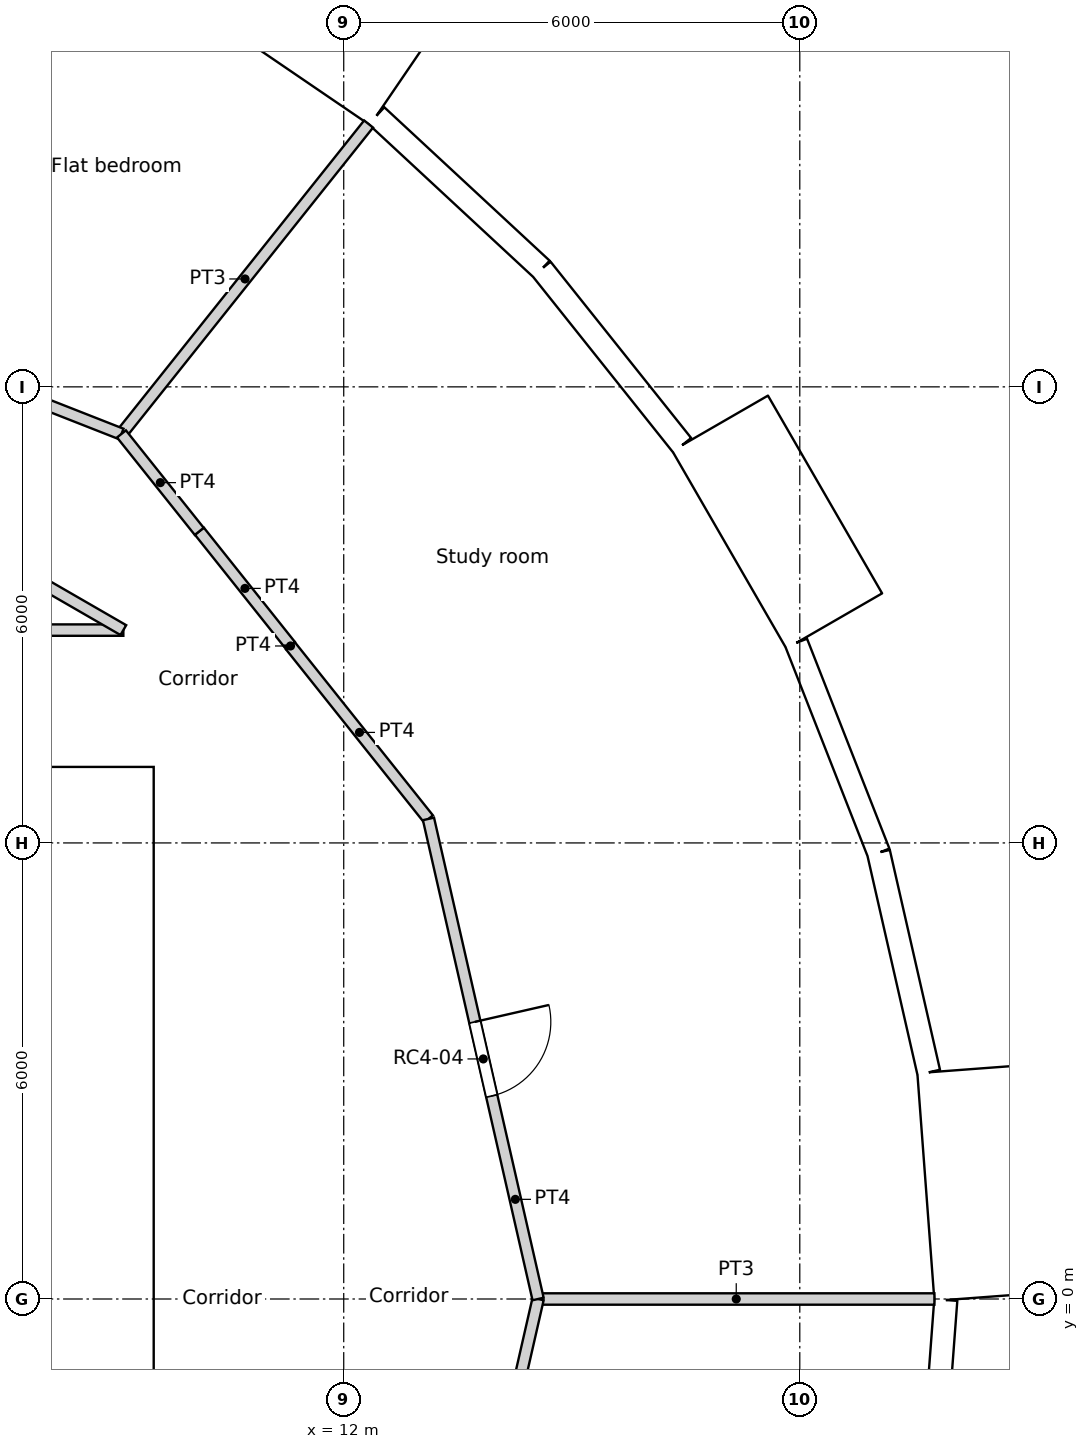
"""IFC4 building model, lengths in metres.
Left out: names, types, materials, properties, quantities, classifications, styles, units other than length and angle.
Written with IfcOpenShell. Run it as: python <this file> out.ifc"""

import sys

from ifc_helpers import new_model, si_unit, direction, frame, frame_2d, origin, origin_2d, place, context, subcontext, project, spatial, rectangle, circle, extrude, element, fill, save


model = new_model("IFC4")
c1 = context("Model", 3, precision=1e-05, world=origin(), true_north=direction((0.0, 1.0)))
c2 = subcontext(c1, "Body", "Model", "MODEL_VIEW")
j1 = project(units=[si_unit("LENGTHUNIT", "METRE"), si_unit("PLANEANGLEUNIT", "RADIAN")], contexts=[c1])
p1 = place(None, origin())
s1 = spatial("IfcSite", under=j1, at=p1, CompositionType="ELEMENT")
p2 = place(p1, origin())
s2 = spatial("IfcBuilding", under=s1, at=p2, CompositionType="ELEMENT")
p3 = place(p2, frame((0.0, 0.0, 263.4)))
s3 = spatial("IfcBuildingStorey", under=s2, at=p3, CompositionType="ELEMENT", Elevation=263.4)
for number, where, z_axis, x_axis in (
    (1, (18.822, 0.0, 0.0), (0.0, 0.0, 1.0), (1.0, 0.0, 0.0)),
    (2, (17.986, 5.548, 0.0), (0.0, 0.0, 1.0), (1.0, 0.0, 0.0)),
    (3, (15.552, 10.603, 0.0), (0.0, 0.0, 1.0), (1.0, 0.0, 0.0)),
    (4, (11.735, 14.716, 0.0), (0.0, 0.0, 1.0), (1.0, 0.0, 0.0)),
):
    element("IfcColumn", number, at=place(p3, frame(where, z_axis=z_axis, x_axis=x_axis)), inside=s3, PredefinedType="COLUMN", context=c2, shape_type="SweptSolid", body=[
        extrude(circle(Radius=0.55, at=origin_2d()), origin(), (0.0, 0.0, 1.0), 3.6),
    ])
p4 = place(p3, frame((20.496, 0.032, -0.35), z_axis=(0.0, 0.0, 1.0), x_axis=(-0.074785902127, 0.997199613339, 0.0)))
e5 = element("IfcWall", 5, at=p4, inside=s3, PredefinedType="ELEMENTEDWALL", context=c2, shape_type="SweptSolid", body=[
    extrude(rectangle(XDim=3.0, YDim=1.45, at=frame_2d((1.5, 0.0))), origin(), (0.0, 0.0, 1.0), 3.6),
])
p5 = place(p4, frame((1.5, 0.0, 1.9)))
e6 = element("IfcOpeningElement", 6, at=p5, cuts=e5, PredefinedType="OPENING", context=c2, shape_type="SweptSolid", body=[
    extrude(circle(Radius=0.9, at=origin_2d()), frame((0.0, 0.735, 0.0), z_axis=(0.0, -1.0, 0.0), x_axis=(1.0, 0.0, 0.0)), (0.0, 0.0, 1.0), 1.47),
])
p6 = place(p3, frame((19.696, 2.984, 0.0), z_axis=(0.0, 0.0, 1.0), x_axis=(-0.222529389789, 0.974925982155, 0.0)))
e7 = element("IfcWall", 7, at=p6, inside=s3, PredefinedType="SOLIDWALL", context=c2, shape_type="SweptSolid", body=[
    extrude(rectangle(XDim=2.962, YDim=0.3, at=frame_2d((1.481, 0.0))), origin(), (0.0, 0.0, 1.0), 3.25),
])
p7 = place(p6, frame((1.481, 0.0, 1.55)))
e8 = element("IfcOpeningElement", 8, at=p7, cuts=e7, PredefinedType="OPENING", context=c2, shape_type="SweptSolid", body=[
    extrude(circle(Radius=0.9, at=origin_2d()), frame((0.0, 0.16, 0.0), z_axis=(0.0, -1.0, 0.0), x_axis=(1.0, 0.0, 0.0)), (0.0, 0.0, 1.0), 0.32),
])
p8 = place(p3, frame((19.037, 5.872, 0.0), z_axis=(0.0, 0.0, 1.0), x_axis=(-0.36530043032, 0.930889679612, 0.0)))
e9 = element("IfcWall", 9, at=p8, inside=s3, PredefinedType="SOLIDWALL", context=c2, shape_type="SweptSolid", body=[
    extrude(rectangle(XDim=2.962, YDim=0.3, at=frame_2d((1.481, 0.0))), origin(), (0.0, 0.0, 1.0), 3.25),
])
p9 = place(p8, frame((1.481, 0.0, 1.55)))
e10 = element("IfcOpeningElement", 10, at=p9, cuts=e9, PredefinedType="OPENING", context=c2, shape_type="SweptSolid", body=[
    extrude(circle(Radius=0.9, at=origin_2d()), frame((0.0, 0.16, 0.0), z_axis=(0.0, -1.0, 0.0), x_axis=(1.0, 0.0, 0.0)), (0.0, 0.0, 1.0), 0.32),
])
p10 = place(p3, frame((18.452, 8.921, -0.35), z_axis=(0.0, 0.0, 1.0), x_axis=(-0.499990139034, 0.866031096941, 0.0)))
e11 = element("IfcWall", 11, at=p10, inside=s3, PredefinedType="ELEMENTEDWALL", context=c2, shape_type="SweptSolid", body=[
    extrude(rectangle(XDim=3.0, YDim=1.45, at=frame_2d((1.5, 0.0))), origin(), (0.0, 0.0, 1.0), 3.6),
])
p11 = place(p10, frame((1.5, 0.0, 1.9)))
e12 = element("IfcOpeningElement", 12, at=p11, cuts=e11, PredefinedType="OPENING", context=c2, shape_type="SweptSolid", body=[
    extrude(circle(Radius=0.9, at=origin_2d()), frame((0.0, 0.735, 0.0), z_axis=(0.0, -1.0, 0.0), x_axis=(1.0, 0.0, 0.0)), (0.0, 0.0, 1.0), 1.47),
])
p12 = place(p3, frame((16.451, 11.234, 0.0), z_axis=(0.0, 0.0, 1.0), x_axis=(-0.623498236992, 0.781824755599, 0.0)))
e13 = element("IfcWall", 13, at=p12, inside=s3, PredefinedType="SOLIDWALL", context=c2, shape_type="SweptSolid", body=[
    extrude(rectangle(XDim=2.962, YDim=0.3, at=frame_2d((1.481, 0.0))), origin(), (0.0, 0.0, 1.0), 3.25),
])
p13 = place(p12, frame((1.481, 0.0, 1.55)))
e14 = element("IfcOpeningElement", 14, at=p13, cuts=e13, PredefinedType="OPENING", context=c2, shape_type="SweptSolid", body=[
    extrude(circle(Radius=0.9, at=origin_2d()), frame((0.0, 0.16, 0.0), z_axis=(0.0, -1.0, 0.0), x_axis=(1.0, 0.0, 0.0)), (0.0, 0.0, 1.0), 0.32),
])
p14 = place(p3, frame((14.604, 13.55, 0.0), z_axis=(0.0, 0.0, 1.0), x_axis=(-0.733066412643, 0.680157066165, 0.0)))
e15 = element("IfcWall", 15, at=p14, inside=s3, PredefinedType="SOLIDWALL", context=c2, shape_type="SweptSolid", body=[
    extrude(rectangle(XDim=2.962, YDim=0.3, at=frame_2d((1.481, 0.0))), origin(), (0.0, 0.0, 1.0), 3.25),
])
p15 = place(p14, frame((1.481, 0.0, 1.55)))
e16 = element("IfcOpeningElement", 16, at=p15, cuts=e15, PredefinedType="OPENING", context=c2, shape_type="SweptSolid", body=[
    extrude(circle(Radius=0.9, at=origin_2d()), frame((0.0, 0.16, 0.0), z_axis=(0.0, -1.0, 0.0), x_axis=(1.0, 0.0, 0.0)), (0.0, 0.0, 1.0), 0.32),
])
p16 = place(p3, frame((12.754, 16.044, -0.35), z_axis=(0.0, 0.0, 1.0), x_axis=(-0.826246281157, 0.563309047392, 0.0)))
e17 = element("IfcWall", 17, at=p16, inside=s3, PredefinedType="ELEMENTEDWALL", context=c2, shape_type="SweptSolid", body=[
    extrude(rectangle(XDim=3.0, YDim=1.45, at=frame_2d((1.5, 0.0))), origin(), (0.0, 0.0, 1.0), 3.6),
])
p17 = place(p16, frame((1.5, 0.0, 1.9)))
e18 = element("IfcOpeningElement", 18, at=p17, cuts=e17, PredefinedType="OPENING", context=c2, shape_type="SweptSolid", body=[
    extrude(circle(Radius=0.9, at=origin_2d()), frame((0.0, 0.735, 0.0), z_axis=(0.0, -1.0, 0.0), x_axis=(1.0, 0.0, 0.0)), (0.0, 0.0, 1.0), 1.47),
])
p18 = place(p3, frame((19.699, -2.969, 0.0), z_axis=(0.0, 0.0, 1.0), x_axis=(0.07474897196, 0.997202382263, 0.0)))
e19 = element("IfcWall", 19, at=p18, inside=s3, PredefinedType="SOLIDWALL", context=c2, shape_type="SweptSolid", body=[
    extrude(rectangle(XDim=2.962, YDim=0.3, at=frame_2d((1.481, 0.0))), origin(), (0.0, 0.0, 1.0), 3.25),
])
p19 = place(p18, frame((1.481, 0.0, 1.55)))
e20 = element("IfcOpeningElement", 20, at=p19, cuts=e19, PredefinedType="OPENING", context=c2, shape_type="SweptSolid", body=[
    extrude(circle(Radius=0.9, at=origin_2d()), frame((0.0, 0.16, 0.0), z_axis=(0.0, -1.0, 0.0), x_axis=(1.0, 0.0, 0.0)), (0.0, 0.0, 1.0), 0.32),
])
p20 = place(p3, frame((-9.5, 6.7, 0.0), z_axis=(0.0, 0.0, 1.0), x_axis=(1.0, 0.0, 0.0)))
e21 = element("IfcWall", 21, at=p20, inside=s3, PredefinedType="SOLIDWALL", context=c2, shape_type="SweptSolid", body=[
    extrude(rectangle(XDim=19.0, YDim=0.6, at=frame_2d((9.5, 0.0))), origin(), (0.0, 0.0, 1.0), 3.6),
])
p21 = place(p20, frame((5.35, 0.0, 0.0)))
e22 = element("IfcOpeningElement", 22, at=p21, cuts=e21, PredefinedType="OPENING", context=c2, shape_type="SweptSolid", body=[
    extrude(rectangle(XDim=1.7, YDim=2.1, at=frame_2d((0.85, 1.05))), frame((0.0, 0.3, 0.0), z_axis=(0.0, -1.0, 0.0), x_axis=(1.0, 0.0, 0.0)), (0.0, 0.0, 1.0), 0.6),
])
p22 = place(p3, frame((9.2, -6.4, 0.0), z_axis=(0.0, 0.0, 1.0), x_axis=(0.0, 1.0, 0.0)))
e23 = element("IfcWall", 23, at=p22, inside=s3, PredefinedType="SOLIDWALL", context=c2, shape_type="SweptSolid", body=[
    extrude(rectangle(XDim=12.8, YDim=0.6, at=frame_2d((6.4, 0.0))), origin(), (0.0, 0.0, 1.0), 3.6),
])
p23 = place(p22, frame((6.4, 0.0, 0.0)))
e24 = element("IfcOpeningElement", 24, at=p23, cuts=e23, PredefinedType="OPENING", context=c2, shape_type="SweptSolid", body=[
    extrude(rectangle(XDim=1.8, YDim=2.1, at=frame_2d((0.9, 1.05))), frame((0.0, 0.3, 0.0), z_axis=(0.0, -1.0, 0.0), x_axis=(1.0, 0.0, 0.0)), (0.0, 0.0, 1.0), 0.6),
])
p24 = place(p3, frame((-4.35, 3.1, 0.0), z_axis=(0.0, 0.0, 1.0), x_axis=(1.0, 0.0, 0.0)))
e25 = element("IfcWall", 25, at=p24, inside=s3, PredefinedType="SOLIDWALL", context=c2, shape_type="SweptSolid", body=[
    extrude(rectangle(XDim=13.25, YDim=0.3, at=frame_2d((6.625, 0.0))), origin(), (0.0, 0.0, 1.0), 3.25),
])
p25 = place(p24, frame((2.95, 0.0, 0.0)))
e26 = element("IfcOpeningElement", 26, at=p25, cuts=e25, PredefinedType="OPENING", context=c2, shape_type="SweptSolid", body=[
    extrude(rectangle(XDim=1.1, YDim=2.1, at=frame_2d((0.55, 1.05))), frame((0.0, 0.15, 0.0), z_axis=(0.0, -1.0, 0.0), x_axis=(1.0, 0.0, 0.0)), (0.0, 0.0, 1.0), 0.3),
])
p26 = place(p24, frame((5.75, 0.0, 0.0)))
e27 = element("IfcOpeningElement", 27, at=p26, cuts=e25, PredefinedType="OPENING", context=c2, shape_type="SweptSolid", body=[
    extrude(rectangle(XDim=1.1, YDim=2.1, at=frame_2d((0.55, 1.05))), frame((0.0, 0.15, 0.0), z_axis=(0.0, -1.0, 0.0), x_axis=(1.0, 0.0, 0.0)), (0.0, 0.0, 1.0), 0.3),
])
p27 = place(p24, frame((8.55, 0.0, 0.0)))
e28 = element("IfcOpeningElement", 28, at=p27, cuts=e25, PredefinedType="OPENING", context=c2, shape_type="SweptSolid", body=[
    extrude(rectangle(XDim=1.1, YDim=2.1, at=frame_2d((0.55, 1.05))), frame((0.0, 0.15, 0.0), z_axis=(0.0, -1.0, 0.0), x_axis=(1.0, 0.0, 0.0)), (0.0, 0.0, 1.0), 0.3),
])
p28 = place(p3, frame((5.85, -0.425, 0.0), z_axis=(0.0, 0.0, 1.0), x_axis=(1.0, 0.0, 0.0)))
e29 = element("IfcWall", 29, at=p28, inside=s3, PredefinedType="SOLIDWALL", context=c2, shape_type="SweptSolid", body=[
    extrude(rectangle(XDim=3.05, YDim=0.15, at=frame_2d((1.525, 0.0))), origin(), (0.0, 0.0, 1.0), 3.25),
])
p29 = place(p28, frame((0.25, 0.0, 0.0)))
e30 = element("IfcOpeningElement", 30, at=p29, cuts=e29, PredefinedType="OPENING", context=c2, shape_type="SweptSolid", body=[
    extrude(rectangle(XDim=0.9, YDim=2.1, at=frame_2d((0.45, 1.05))), frame((0.0, 0.075, 0.0), z_axis=(0.0, -1.0, 0.0), x_axis=(1.0, 0.0, 0.0)), (0.0, 0.0, 1.0), 0.15),
])
p30 = place(p28, frame((1.775, 0.0, 0.0)))
e31 = element("IfcOpeningElement", 31, at=p30, cuts=e29, PredefinedType="OPENING", context=c2, shape_type="SweptSolid", body=[
    extrude(rectangle(XDim=0.9, YDim=2.1, at=frame_2d((0.45, 1.05))), frame((0.0, 0.075, 0.0), z_axis=(0.0, -1.0, 0.0), x_axis=(1.0, 0.0, 0.0)), (0.0, 0.0, 1.0), 0.15),
])
p31 = place(p3, frame((2.352, 8.8, 0.0), z_axis=(0.0, 0.0, 1.0), x_axis=(1.0, 0.0, 0.0)))
e32 = element("IfcWall", 32, at=p31, inside=s3, PredefinedType="PARTITIONING", context=c2, shape_type="SweptSolid", body=[
    extrude(rectangle(XDim=6.749, YDim=0.15, at=frame_2d((3.374, 0.0))), origin(), (0.0, 0.0, 1.0), 3.25),
])
p32 = place(p31, frame((2.87, 0.0, 0.0)))
e33 = element("IfcOpeningElement", 33, at=p32, cuts=e32, PredefinedType="OPENING", context=c2, shape_type="SweptSolid", body=[
    extrude(rectangle(XDim=1.0, YDim=2.04, at=frame_2d((0.5, 1.02))), frame((0.0, 0.075, 0.0), z_axis=(0.0, -1.0, 0.0), x_axis=(1.0, 0.0, 0.0)), (0.0, 0.0, 1.0), 0.15),
])
p33 = place(p3, frame((10.101, 10.101, 0.0), z_axis=(0.0, 0.0, 1.0), x_axis=(0.623130947784, -0.782117524362, 0.0)))
e34 = element("IfcWall", 34, at=p33, inside=s3, PredefinedType="PARTITIONING", context=c2, shape_type="SweptSolid", body=[
    extrude(rectangle(XDim=1.924, YDim=0.15, at=frame_2d((0.962, 0.0))), origin(), (0.0, 0.0, 1.0), 3.25),
])
p34 = place(p3, frame((11.3, 8.586, 0.0), z_axis=(0.0, 0.0, 1.0), x_axis=(0.0, 1.0, 0.0)))
e35 = element("IfcWall", 35, at=p34, inside=s3, PredefinedType="PARTITIONING", context=c2, shape_type="SweptSolid", body=[
    extrude(rectangle(XDim=0.01, YDim=0.15, at=frame_2d((0.005, 0.0))), origin(), (0.0, 0.0, 1.0), 3.25),
])
p35 = place(p3, frame((11.3, 8.592, 0.0), z_axis=(0.0, 0.0, 1.0), x_axis=(0.623446514299, -0.781866001185, 0.0)))
e36 = element("IfcWall", 36, at=p35, inside=s3, PredefinedType="PARTITIONING", context=c2, shape_type="SweptSolid", body=[
    extrude(rectangle(XDim=2.911, YDim=0.15, at=frame_2d((1.456, 0.0))), origin(), (0.0, 0.0, 1.0), 3.25),
])
p36 = place(p3, frame((13.115, 6.316, 0.0), z_axis=(0.0, 0.0, 1.0), x_axis=(0.222568978642, -0.97491694505, 0.0)))
e37 = element("IfcWall", 37, at=p36, inside=s3, PredefinedType="PARTITIONING", context=c2, shape_type="SweptSolid", body=[
    extrude(rectangle(XDim=6.479, YDim=0.15, at=frame_2d((3.239, 0.0))), origin(), (0.0, 0.0, 1.0), 3.25),
])
p37 = place(p36, frame((2.739, 0.0, 0.0)))
e38 = element("IfcOpeningElement", 38, at=p37, cuts=e37, PredefinedType="OPENING", context=c2, shape_type="SweptSolid", body=[
    extrude(rectangle(XDim=1.0, YDim=2.04, at=frame_2d((0.5, 1.02))), frame((0.0, 0.075, 0.0), z_axis=(0.0, -1.0, 0.0), x_axis=(1.0, 0.0, 0.0)), (0.0, 0.0, 1.0), 0.15),
])
p38 = place(p3, frame((13.115, -6.316, 0.0), z_axis=(0.0, 0.0, 1.0), x_axis=(0.222568978642, 0.97491694505, 0.0)))
e39 = element("IfcWall", 39, at=p38, inside=s3, PredefinedType="PARTITIONING", context=c2, shape_type="SweptSolid", body=[
    extrude(rectangle(XDim=6.479, YDim=0.15, at=frame_2d((3.239, 0.0))), origin(), (0.0, 0.0, 1.0), 3.25),
])
p39 = place(p38, frame((2.74, 0.0, 0.0)))
e40 = element("IfcOpeningElement", 40, at=p39, cuts=e39, PredefinedType="OPENING", context=c2, shape_type="SweptSolid", body=[
    extrude(rectangle(XDim=1.0, YDim=2.04, at=frame_2d((0.5, 1.02))), frame((0.0, 0.075, 0.0), z_axis=(0.0, -1.0, 0.0), x_axis=(1.0, 0.0, 0.0)), (0.0, 0.0, 1.0), 0.15),
])
p40 = place(p3, frame((3.261, 12.171, 0.0), z_axis=(0.0, 0.0, 1.0), x_axis=(0.866066809554, -0.499928276245, 0.0)))
e41 = element("IfcWall", 41, at=p40, inside=s3, PredefinedType="PARTITIONING", context=c2, shape_type="SweptSolid", body=[
    extrude(rectangle(XDim=6.743, YDim=0.15, at=frame_2d((3.371, 0.0))), origin(), (0.0, 0.0, 1.0), 3.25),
])
p41 = place(p3, frame((9.076, 11.381, 0.0), z_axis=(0.0, 0.0, 1.0), x_axis=(0.623805208652, -0.781579849829, 0.0)))
e42 = element("IfcWall", 42, at=p41, inside=s3, PredefinedType="PARTITIONING", context=c2, shape_type="SweptSolid", body=[
    extrude(rectangle(XDim=1.64, YDim=0.15, at=frame_2d((0.82, 0.0))), origin(), (0.0, 0.0, 1.0), 3.25),
])
p42 = place(p3, frame((1.088, 14.516, 0.0), z_axis=(0.0, 0.0, 1.0), x_axis=(0.930800934608, -0.365526497168, 0.0)))
e43 = element("IfcWall", 43, at=p42, inside=s3, PredefinedType="PARTITIONING", context=c2, shape_type="SweptSolid", body=[
    extrude(rectangle(XDim=8.581, YDim=0.15, at=frame_2d((4.291, 0.0))), origin(), (0.0, 0.0, 1.0), 3.25),
])
p43 = place(p42, frame((0.864, 0.0, 0.0)))
e44 = element("IfcOpeningElement", 44, at=p43, cuts=e43, PredefinedType="OPENING", context=c2, shape_type="SweptSolid", body=[
    extrude(rectangle(XDim=1.0, YDim=2.1, at=frame_2d((0.5, 1.05))), frame((0.0, 0.075, 0.0), z_axis=(0.0, -1.0, 0.0), x_axis=(1.0, 0.0, 0.0)), (0.0, 0.0, 1.0), 0.15),
])
p44 = place(p3, frame((9.076, 11.381, 0.0), z_axis=(0.0, 0.0, 1.0), x_axis=(0.623460949534, 0.781854490558, 0.0)))
e45 = element("IfcWall", 45, at=p44, inside=s3, PredefinedType="PARTITIONING", context=c2, shape_type="SweptSolid", body=[
    extrude(rectangle(XDim=5.214, YDim=0.15, at=frame_2d((2.607, 0.0))), origin(), (0.0, 0.0, 1.0), 3.25),
])
p45 = place(p3, frame((14.557, 0.0, 0.0), z_axis=(0.0, 0.0, 1.0), x_axis=(1.0, 0.0, 0.0)))
e46 = element("IfcWall", 46, at=p45, inside=s3, PredefinedType="PARTITIONING", context=c2, shape_type="SweptSolid", body=[
    extrude(rectangle(XDim=5.214, YDim=0.15, at=frame_2d((2.607, 0.0))), origin(), (0.0, 0.0, 1.0), 3.25),
])
p46 = place(p5, origin())
e47 = element("IfcWindow", 47, at=p46, inside=s3, PartitioningType="SINGLE_PANEL", PredefinedType="WINDOW", context=c2, shape_type="SweptSolid", body=[
    extrude(circle(Radius=0.9, at=origin_2d()), frame((0.0, 0.695, 0.0), z_axis=(0.0, -1.0, 0.0), x_axis=(1.0, 0.0, 0.0)), (0.0, 0.0, 1.0), 0.1),
])
fill(e6, e47)
p47 = place(p7, origin())
e48 = element("IfcWindow", 48, at=p47, inside=s3, PartitioningType="SINGLE_PANEL", PredefinedType="WINDOW", context=c2, shape_type="SweptSolid", body=[
    extrude(circle(Radius=0.9, at=origin_2d()), frame((0.0, 0.12, 0.0), z_axis=(0.0, -1.0, 0.0), x_axis=(1.0, 0.0, 0.0)), (0.0, 0.0, 1.0), 0.1),
])
fill(e8, e48)
p48 = place(p9, origin())
e49 = element("IfcWindow", 49, at=p48, inside=s3, PartitioningType="SINGLE_PANEL", PredefinedType="WINDOW", context=c2, shape_type="SweptSolid", body=[
    extrude(circle(Radius=0.9, at=origin_2d()), frame((0.0, 0.12, 0.0), z_axis=(0.0, -1.0, 0.0), x_axis=(1.0, 0.0, 0.0)), (0.0, 0.0, 1.0), 0.1),
])
fill(e10, e49)
p49 = place(p11, origin())
e50 = element("IfcWindow", 50, at=p49, inside=s3, PartitioningType="SINGLE_PANEL", PredefinedType="WINDOW", context=c2, shape_type="SweptSolid", body=[
    extrude(circle(Radius=0.9, at=origin_2d()), frame((0.0, 0.695, 0.0), z_axis=(0.0, -1.0, 0.0), x_axis=(1.0, 0.0, 0.0)), (0.0, 0.0, 1.0), 0.1),
])
fill(e12, e50)
p50 = place(p13, origin())
e51 = element("IfcWindow", 51, at=p50, inside=s3, PartitioningType="SINGLE_PANEL", PredefinedType="WINDOW", context=c2, shape_type="SweptSolid", body=[
    extrude(circle(Radius=0.9, at=origin_2d()), frame((0.0, 0.12, 0.0), z_axis=(0.0, -1.0, 0.0), x_axis=(1.0, 0.0, 0.0)), (0.0, 0.0, 1.0), 0.1),
])
fill(e14, e51)
p51 = place(p15, origin())
e52 = element("IfcWindow", 52, at=p51, inside=s3, PartitioningType="SINGLE_PANEL", PredefinedType="WINDOW", context=c2, shape_type="SweptSolid", body=[
    extrude(circle(Radius=0.9, at=origin_2d()), frame((0.0, 0.12, 0.0), z_axis=(0.0, -1.0, 0.0), x_axis=(1.0, 0.0, 0.0)), (0.0, 0.0, 1.0), 0.1),
])
fill(e16, e52)
p52 = place(p17, origin())
e53 = element("IfcWindow", 53, at=p52, inside=s3, PartitioningType="SINGLE_PANEL", PredefinedType="WINDOW", context=c2, shape_type="SweptSolid", body=[
    extrude(circle(Radius=0.9, at=origin_2d()), frame((0.0, 0.695, 0.0), z_axis=(0.0, -1.0, 0.0), x_axis=(1.0, 0.0, 0.0)), (0.0, 0.0, 1.0), 0.1),
])
fill(e18, e53)
p53 = place(p19, origin())
e54 = element("IfcWindow", 54, at=p53, inside=s3, PartitioningType="SINGLE_PANEL", PredefinedType="WINDOW", context=c2, shape_type="SweptSolid", body=[
    extrude(circle(Radius=0.9, at=origin_2d()), frame((0.0, 0.12, 0.0), z_axis=(0.0, -1.0, 0.0), x_axis=(1.0, 0.0, 0.0)), (0.0, 0.0, 1.0), 0.1),
])
fill(e20, e54)
p54 = place(p23, origin())
e55 = element("IfcDoor", 55, at=p54, inside=s3, OperationType="DOUBLE_DOOR_SINGLE_SWING", PredefinedType="DOOR", context=c2, shape_type="SweptSolid", body=[
    extrude(rectangle(XDim=1.8, YDim=2.1, at=frame_2d((0.9, 1.05))), frame((0.0, 0.025, 0.0), z_axis=(0.0, -1.0, 0.0), x_axis=(1.0, 0.0, 0.0)), (0.0, 0.0, 1.0), 0.05),
])
fill(e24, e55)
p55 = place(p30, origin())
e56 = element("IfcDoor", 56, at=p55, inside=s3, OperationType="SINGLE_SWING_LEFT", PredefinedType="DOOR", context=c2, shape_type="SweptSolid", body=[
    extrude(rectangle(XDim=0.9, YDim=2.1, at=frame_2d((0.45, 1.05))), frame((0.0, 0.025, 0.0), z_axis=(0.0, -1.0, 0.0), x_axis=(1.0, 0.0, 0.0)), (0.0, 0.0, 1.0), 0.05),
])
fill(e31, e56)
p56 = place(p37, origin())
e57 = element("IfcDoor", 57, at=p56, inside=s3, OperationType="SINGLE_SWING_LEFT", PredefinedType="DOOR", context=c2, shape_type="SweptSolid", body=[
    extrude(rectangle(XDim=1.0, YDim=2.04, at=frame_2d((0.5, 1.02))), frame((0.0, 0.025, 0.0), z_axis=(0.0, -1.0, 0.0), x_axis=(1.0, 0.0, 0.0)), (0.0, 0.0, 1.0), 0.05),
])
fill(e38, e57)
save(model, sys.argv[1])
